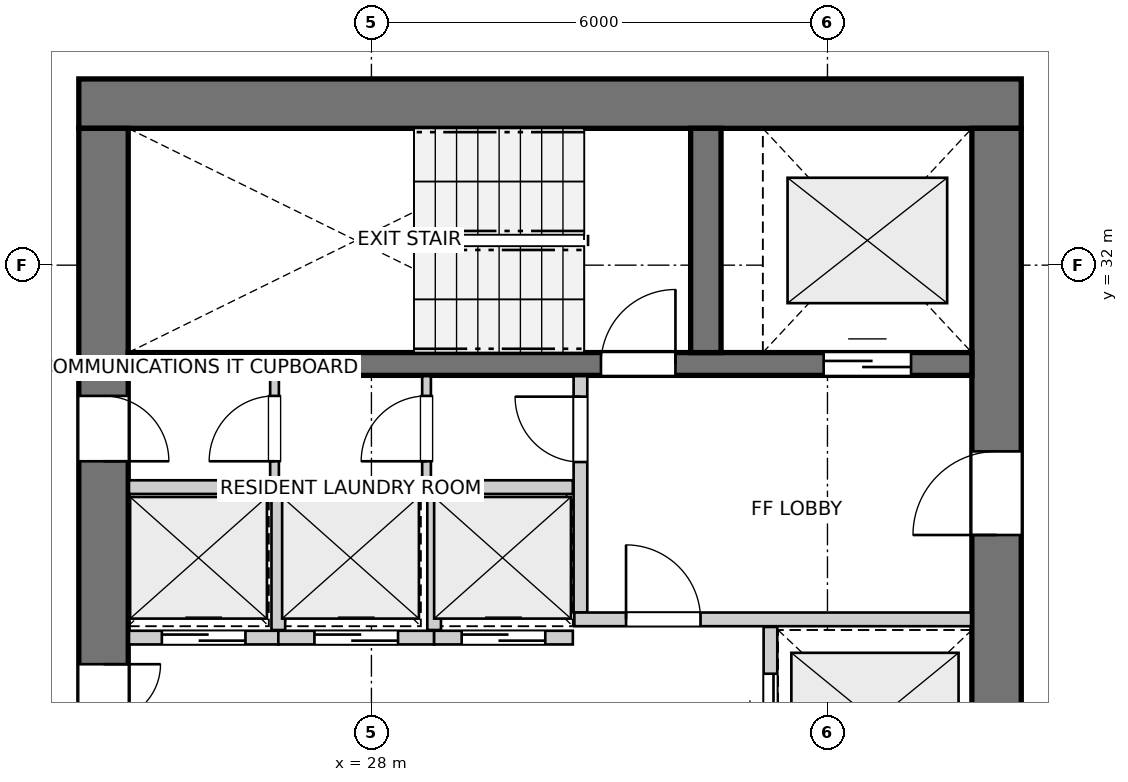
"""IFC4 building model, lengths in metres.
Left out: names, types, materials, properties, quantities, classifications, styles, units other than length and angle.
Written with IfcOpenShell. Run it as: python <this file> out.ifc"""

import sys

from ifc_helpers import new_model, si_unit, direction, frame, frame_2d, origin, place, context, subcontext, project, spatial, rectangle, extrude, source, transform, mapped, element, fill, save


model = new_model("IFC4")
c1 = context("Model", 3, precision=1e-05, world=origin(), true_north=direction((0.0, 1.0)))
c2 = subcontext(c1, "Body", "Model", "MODEL_VIEW")
j1 = project(units=[si_unit("LENGTHUNIT", "METRE"), si_unit("PLANEANGLEUNIT", "RADIAN")], contexts=[c1])
p1 = place(None, origin())
s1 = spatial("IfcSite", under=j1, at=p1, CompositionType="ELEMENT")
p2 = place(p1, origin())
s2 = spatial("IfcBuilding", under=s1, at=p2, CompositionType="ELEMENT")
p3 = place(p2, frame((0.0, 0.0, 187.4)))
s3 = spatial("IfcBuildingStorey", under=s2, at=p3, CompositionType="ELEMENT", Elevation=187.4)
p4 = place(p3, frame((36.55, 34.125, 0.0), z_axis=(0.0, 0.0, 1.0), x_axis=(-1.0, 0.0, 0.0)))
e1 = element("IfcWall", 1, at=p4, inside=s3, PredefinedType="SHEAR", context=c2, shape_type="SweptSolid", body=[
    extrude(rectangle(XDim=12.4, YDim=0.65, at=frame_2d((6.2, 0.0))), origin(), (0.0, 0.0, 1.0), 2.9),
])
p5 = place(p3, frame((24.475, 33.8, 0.0), z_axis=(0.0, 0.0, 1.0), x_axis=(0.0, -1.0, 0.0)))
e2 = element("IfcWall", 2, at=p5, inside=s3, PredefinedType="SHEAR", context=c2, shape_type="SweptSolid", body=[
    extrude(rectangle(XDim=15.6, YDim=0.65, at=frame_2d((7.8, 0.0))), origin(), (0.0, 0.0, 1.0), 2.9),
])
p6 = place(p5, frame((7.05, 0.0, 0.0)))
e3 = element("IfcOpeningElement", 3, at=p6, cuts=e2, PredefinedType="OPENING", context=c2, shape_type="SweptSolid", body=[
    extrude(rectangle(XDim=1.5, YDim=2.15, at=frame_2d((0.75, 1.075))), frame((0.0, 0.335, 0.0), z_axis=(0.0, -1.0, 0.0), x_axis=(1.0, 0.0, 0.0)), (0.0, 0.0, 1.0), 0.67),
])
p7 = place(p5, frame((3.52, 0.0, 0.0)))
e4 = element("IfcOpeningElement", 4, at=p7, cuts=e2, PredefinedType="OPENING", context=c2, shape_type="SweptSolid", body=[
    extrude(rectangle(XDim=0.86, YDim=2.05, at=frame_2d((0.43, 1.025))), frame((0.0, 0.335, 0.0), z_axis=(0.0, -1.0, 0.0), x_axis=(1.0, 0.0, 0.0)), (0.0, 0.0, 1.0), 0.67),
])
p8 = place(p5, frame((11.22, 0.0, 0.0)))
e5 = element("IfcOpeningElement", 5, at=p8, cuts=e2, PredefinedType="OPENING", context=c2, shape_type="SweptSolid", body=[
    extrude(rectangle(XDim=0.86, YDim=2.05, at=frame_2d((0.43, 1.025))), frame((0.0, 0.335, 0.0), z_axis=(0.0, -1.0, 0.0), x_axis=(1.0, 0.0, 0.0)), (0.0, 0.0, 1.0), 0.67),
])
p9 = place(p3, frame((36.225, 18.2, 0.0), z_axis=(0.0, 0.0, 1.0), x_axis=(0.0, 1.0, 0.0)))
e6 = element("IfcWall", 6, at=p9, inside=s3, PredefinedType="SHEAR", context=c2, shape_type="SweptSolid", body=[
    extrude(rectangle(XDim=15.6, YDim=0.65, at=frame_2d((7.8, 0.0))), origin(), (0.0, 0.0, 1.0), 2.9),
])
p10 = place(p9, frame((4.25, 0.0, 0.0)))
e7 = element("IfcOpeningElement", 7, at=p10, cuts=e6, PredefinedType="OPENING", context=c2, shape_type="SweptSolid", body=[
    extrude(rectangle(XDim=1.1, YDim=2.15, at=frame_2d((0.55, 1.075))), frame((0.0, 0.335, 0.0), z_axis=(0.0, -1.0, 0.0), x_axis=(1.0, 0.0, 0.0)), (0.0, 0.0, 1.0), 0.67),
])
p11 = place(p9, frame((10.25, 0.0, 0.0)))
e8 = element("IfcOpeningElement", 8, at=p11, cuts=e6, PredefinedType="OPENING", context=c2, shape_type="SweptSolid", body=[
    extrude(rectangle(XDim=1.1, YDim=2.15, at=frame_2d((0.55, 1.075))), frame((0.0, 0.335, 0.0), z_axis=(0.0, -1.0, 0.0), x_axis=(1.0, 0.0, 0.0)), (0.0, 0.0, 1.0), 0.67),
])
p12 = place(p3, frame((24.8, 30.7, 0.0), z_axis=(0.0, 0.0, 1.0), x_axis=(1.0, 0.0, 0.0)))
e9 = element("IfcWall", 9, at=p12, inside=s3, PredefinedType="SHEAR", context=c2, shape_type="SweptSolid", body=[
    extrude(rectangle(XDim=11.1, YDim=0.3, at=frame_2d((5.55, 0.0))), origin(), (0.0, 0.0, 1.0), 2.9),
])
p13 = place(p12, frame((6.22, 0.0, 0.0)))
e10 = element("IfcOpeningElement", 10, at=p13, cuts=e9, PredefinedType="OPENING", context=c2, shape_type="SweptSolid", body=[
    extrude(rectangle(XDim=0.98, YDim=2.15, at=frame_2d((0.49, 1.075))), frame((0.0, 0.16, 0.0), z_axis=(0.0, -1.0, 0.0), x_axis=(1.0, 0.0, 0.0)), (0.0, 0.0, 1.0), 0.32),
])
p14 = place(p12, frame((9.15, 0.0, 0.0)))
e11 = element("IfcOpeningElement", 11, at=p14, cuts=e9, PredefinedType="OPENING", context=c2, shape_type="SweptSolid", body=[
    extrude(rectangle(XDim=1.15, YDim=2.15, at=frame_2d((0.575, 1.075))), frame((0.0, 0.16, 0.0), z_axis=(0.0, -1.0, 0.0), x_axis=(1.0, 0.0, 0.0)), (0.0, 0.0, 1.0), 0.32),
])
p15 = place(p3, frame((32.4, 30.85, 0.0), z_axis=(0.0, 0.0, 1.0), x_axis=(0.0, 1.0, 0.0)))
e12 = element("IfcWall", 12, at=p15, inside=s3, PredefinedType="SHEAR", context=c2, shape_type="SweptSolid", body=[
    extrude(rectangle(XDim=2.95, YDim=0.4, at=frame_2d((1.475, 0.0))), origin(), (0.0, 0.0, 1.0), 2.9),
])
p16 = place(p3, frame((30.75, 27.43, 0.0), z_axis=(0.0, 0.0, 1.0), x_axis=(0.0, 1.0, 0.0)))
e13 = element("IfcWall", 13, at=p16, inside=s3, PredefinedType="PARTITIONING", context=c2, shape_type="SweptSolid", body=[
    extrude(rectangle(XDim=3.11, YDim=0.18, at=frame_2d((1.555, 0.0))), origin(), (0.0, 0.0, 1.0), 2.9),
])
p17 = place(p16, frame((1.98, 0.0, 0.0)))
e14 = element("IfcOpeningElement", 14, at=p17, cuts=e13, PredefinedType="OPENING", context=c2, shape_type="SweptSolid", body=[
    extrude(rectangle(XDim=0.86, YDim=2.05, at=frame_2d((0.43, 1.025))), frame((0.0, 0.1, 0.0), z_axis=(0.0, -1.0, 0.0), x_axis=(1.0, 0.0, 0.0)), (0.0, 0.0, 1.0), 0.2),
])
p18 = place(p3, frame((30.67, 27.34, 0.0), z_axis=(0.0, 0.0, 1.0), x_axis=(1.0, 0.0, 0.0)))
e15 = element("IfcWall", 15, at=p18, inside=s3, PredefinedType="PARTITIONING", context=c2, shape_type="SweptSolid", body=[
    extrude(rectangle(XDim=5.22, YDim=0.18, at=frame_2d((2.61, 0.0))), origin(), (0.0, 0.0, 1.0), 2.9),
])
p19 = place(p18, frame((0.68, 0.0, 0.0)))
e16 = element("IfcOpeningElement", 16, at=p19, cuts=e15, PredefinedType="OPENING", context=c2, shape_type="SweptSolid", body=[
    extrude(rectangle(XDim=0.98, YDim=2.15, at=frame_2d((0.49, 1.075))), frame((0.0, 0.1, 0.0), z_axis=(0.0, -1.0, 0.0), x_axis=(1.0, 0.0, 0.0)), (0.0, 0.0, 1.0), 0.2),
])
p20 = place(p3, frame((33.25, 24.76, 0.0), z_axis=(0.0, 0.0, 1.0), x_axis=(0.0, 1.0, 0.0)))
e17 = element("IfcWall", 17, at=p20, inside=s3, PredefinedType="PARTITIONING", context=c2, shape_type="SweptSolid", body=[
    extrude(rectangle(XDim=2.48, YDim=0.18, at=frame_2d((1.24, 0.0))), origin(), (0.0, 0.0, 1.0), 2.9),
])
p21 = place(p20, frame((0.615, 0.0, 0.0)))
e18 = element("IfcOpeningElement", 18, at=p21, cuts=e17, PredefinedType="OPENING", context=c2, shape_type="SweptSolid", body=[
    extrude(rectangle(XDim=1.25, YDim=2.15, at=frame_2d((0.625, 1.075))), frame((0.0, 0.1, 0.0), z_axis=(0.0, -1.0, 0.0), x_axis=(1.0, 0.0, 0.0)), (0.0, 0.0, 1.0), 0.2),
])
p22 = place(p3, frame((24.81, 29.08, 0.0), z_axis=(0.0, 0.0, 1.0), x_axis=(1.0, 0.0, 0.0)))
e19 = element("IfcWall", 19, at=p22, inside=s3, PredefinedType="PARTITIONING", context=c2, shape_type="SweptSolid", body=[
    extrude(rectangle(XDim=5.84, YDim=0.18, at=frame_2d((2.92, 0.0))), origin(), (0.0, 0.0, 1.0), 2.9),
])
p23 = place(p3, frame((24.81, 27.1, 0.0), z_axis=(0.0, 0.0, 1.0), x_axis=(1.0, 0.0, 0.0)))
e20 = element("IfcWall", 20, at=p23, inside=s3, PredefinedType="PARTITIONING", context=c2, shape_type="SweptSolid", body=[
    extrude(rectangle(XDim=1.965, YDim=0.18, at=frame_2d((0.982, 0.0))), origin(), (0.0, 0.0, 1.0), 2.9),
])
p24 = place(p23, frame((0.433, 0.0, 0.0)))
e21 = element("IfcOpeningElement", 21, at=p24, cuts=e20, PredefinedType="OPENING", context=c2, shape_type="SweptSolid", body=[
    extrude(rectangle(XDim=1.1, YDim=2.15, at=frame_2d((0.55, 1.075))), frame((0.0, 0.1, 0.0), z_axis=(0.0, -1.0, 0.0), x_axis=(1.0, 0.0, 0.0)), (0.0, 0.0, 1.0), 0.2),
])
p25 = place(p3, frame((26.775, 27.1, 0.0), z_axis=(0.0, 0.0, 1.0), x_axis=(1.0, 0.0, 0.0)))
e22 = element("IfcWall", 22, at=p25, inside=s3, PredefinedType="PARTITIONING", context=c2, shape_type="SweptSolid", body=[
    extrude(rectangle(XDim=2.05, YDim=0.18, at=frame_2d((1.025, 0.0))), origin(), (0.0, 0.0, 1.0), 2.9),
])
p26 = place(p25, frame((0.475, 0.0, 0.0)))
e23 = element("IfcOpeningElement", 23, at=p26, cuts=e22, PredefinedType="OPENING", context=c2, shape_type="SweptSolid", body=[
    extrude(rectangle(XDim=1.1, YDim=2.15, at=frame_2d((0.55, 1.075))), frame((0.0, 0.1, 0.0), z_axis=(0.0, -1.0, 0.0), x_axis=(1.0, 0.0, 0.0)), (0.0, 0.0, 1.0), 0.2),
])
p27 = place(p3, frame((26.775, 27.2, 0.0), z_axis=(0.0, 0.0, 1.0), x_axis=(0.0, 1.0, 0.0)))
e24 = element("IfcWall", 24, at=p27, inside=s3, PredefinedType="PARTITIONING", context=c2, shape_type="SweptSolid", body=[
    extrude(rectangle(XDim=1.78, YDim=0.18, at=frame_2d((0.89, 0.0))), origin(), (0.0, 0.0, 1.0), 2.9),
])
p28 = place(p3, frame((28.825, 27.1, 0.0), z_axis=(0.0, 0.0, 1.0), x_axis=(1.0, 0.0, 0.0)))
e25 = element("IfcWall", 25, at=p28, inside=s3, PredefinedType="PARTITIONING", context=c2, shape_type="SweptSolid", body=[
    extrude(rectangle(XDim=1.825, YDim=0.18, at=frame_2d((0.913, 0.0))), origin(), (0.0, 0.0, 1.0), 2.9),
])
p29 = place(p28, frame((0.363, 0.0, 0.0)))
e26 = element("IfcOpeningElement", 26, at=p29, cuts=e25, PredefinedType="OPENING", context=c2, shape_type="SweptSolid", body=[
    extrude(rectangle(XDim=1.1, YDim=2.15, at=frame_2d((0.55, 1.075))), frame((0.0, 0.1, 0.0), z_axis=(0.0, -1.0, 0.0), x_axis=(1.0, 0.0, 0.0)), (0.0, 0.0, 1.0), 0.2),
])
p30 = place(p3, frame((28.825, 27.2, 0.0), z_axis=(0.0, 0.0, 1.0), x_axis=(0.0, 1.0, 0.0)))
e27 = element("IfcWall", 27, at=p30, inside=s3, PredefinedType="PARTITIONING", context=c2, shape_type="SweptSolid", body=[
    extrude(rectangle(XDim=1.78, YDim=0.18, at=frame_2d((0.89, 0.0))), origin(), (0.0, 0.0, 1.0), 2.9),
])
p31 = place(p3, frame((26.725, 29.16, 0.0), z_axis=(0.0, 0.0, 1.0), x_axis=(0.0, 1.0, 0.0)))
e28 = element("IfcWall", 28, at=p31, inside=s3, PredefinedType="PARTITIONING", context=c2, shape_type="SweptSolid", body=[
    extrude(rectangle(XDim=1.38, YDim=0.115, at=frame_2d((0.69, 0.0))), origin(), (0.0, 0.0, 1.0), 2.9),
])
p32 = place(p31, frame((0.26, 0.0, 0.0)))
e29 = element("IfcOpeningElement", 29, at=p32, cuts=e28, PredefinedType="OPENING", context=c2, shape_type="SweptSolid", body=[
    extrude(rectangle(XDim=0.86, YDim=2.05, at=frame_2d((0.43, 1.025))), frame((0.0, 0.067, 0.0), z_axis=(0.0, -1.0, 0.0), x_axis=(1.0, 0.0, 0.0)), (0.0, 0.0, 1.0), 0.135),
])
p33 = place(p3, frame((28.725, 29.16, 0.0), z_axis=(0.0, 0.0, 1.0), x_axis=(0.0, 1.0, 0.0)))
e30 = element("IfcWall", 30, at=p33, inside=s3, PredefinedType="PARTITIONING", context=c2, shape_type="SweptSolid", body=[
    extrude(rectangle(XDim=1.38, YDim=0.115, at=frame_2d((0.69, 0.0))), origin(), (0.0, 0.0, 1.0), 2.9),
])
p34 = place(p33, frame((0.26, 0.0, 0.0)))
e31 = element("IfcOpeningElement", 31, at=p34, cuts=e30, PredefinedType="OPENING", context=c2, shape_type="SweptSolid", body=[
    extrude(rectangle(XDim=0.86, YDim=2.05, at=frame_2d((0.43, 1.025))), frame((0.0, 0.067, 0.0), z_axis=(0.0, -1.0, 0.0), x_axis=(1.0, 0.0, 0.0)), (0.0, 0.0, 1.0), 0.135),
])
m1 = source(origin(), c2, "Body", "SweptSolid", [
    extrude(rectangle(XDim=0.98, YDim=2.15, at=frame_2d((0.49, 1.075))), frame((0.0, 0.025, 0.0), z_axis=(0.0, -1.0, 0.0), x_axis=(1.0, 0.0, 0.0)), (0.0, 0.0, 1.0), 0.05),
])
p35 = place(p13, origin())
e32 = element("IfcDoor", 32, at=p35, inside=s3, OperationType="SINGLE_SWING_RIGHT", PredefinedType="DOOR", context=c2, shape_type="MappedRepresentation", body=[
    mapped(m1, transform((0.0, 0.0, 0.0), x_axis=(1.0, 0.0, 0.0), y_axis=(0.0, 1.0, 0.0), z_axis=(0.0, 0.0, 1.0), scale=1.0)),
])
fill(e10, e32)
m2 = source(origin(), c2, "Body", "SweptSolid", [
    extrude(rectangle(XDim=1.15, YDim=2.15, at=frame_2d((0.575, 1.075))), frame((0.0, 0.025, 0.0), z_axis=(0.0, -1.0, 0.0), x_axis=(1.0, 0.0, 0.0)), (0.0, 0.0, 1.0), 0.05),
])
p36 = place(p14, origin())
e33 = element("IfcDoor", 33, at=p36, inside=s3, OperationType="DOUBLE_DOOR_SLIDING", PredefinedType="DOOR", context=c2, shape_type="MappedRepresentation", body=[
    mapped(m2, transform((0.0, 0.0, 0.0), x_axis=(1.0, 0.0, 0.0), y_axis=(0.0, 1.0, 0.0), z_axis=(0.0, 0.0, 1.0), scale=1.0)),
])
fill(e11, e33)
m3 = source(origin(), c2, "Body", "SweptSolid", [
    extrude(rectangle(XDim=1.1, YDim=2.15, at=frame_2d((0.55, 1.075))), frame((0.0, 0.025, 0.0), z_axis=(0.0, -1.0, 0.0), x_axis=(1.0, 0.0, 0.0)), (0.0, 0.0, 1.0), 0.05),
])
p37 = place(p11, origin())
e34 = element("IfcDoor", 34, at=p37, inside=s3, OperationType="SINGLE_SWING_LEFT", PredefinedType="DOOR", context=c2, shape_type="MappedRepresentation", body=[
    mapped(m3, transform((0.0, 0.0, 0.0), x_axis=(1.0, 0.0, 0.0), y_axis=(0.0, 1.0, 0.0), z_axis=(0.0, 0.0, 1.0), scale=1.0)),
])
fill(e8, e34)
m4 = source(origin(), c2, "Body", "SweptSolid", [
    extrude(rectangle(XDim=1.5, YDim=2.15, at=frame_2d((0.75, 1.075))), frame((0.0, 0.025, 0.0), z_axis=(0.0, -1.0, 0.0), x_axis=(1.0, 0.0, 0.0)), (0.0, 0.0, 1.0), 0.05),
])
p38 = place(p6, origin())
e35 = element("IfcDoor", 35, at=p38, inside=s3, OperationType="DOUBLE_DOOR_SINGLE_SWING", PredefinedType="DOOR", context=c2, shape_type="MappedRepresentation", body=[
    mapped(m4, transform((0.0, 0.0, 0.0), x_axis=(1.0, 0.0, 0.0), y_axis=(0.0, 1.0, 0.0), z_axis=(0.0, 0.0, 1.0), scale=1.0)),
])
fill(e3, e35)
m5 = source(origin(), c2, "Body", "SweptSolid", [
    extrude(rectangle(XDim=0.86, YDim=2.05, at=frame_2d((0.43, 1.025))), frame((0.0, 0.025, 0.0), z_axis=(0.0, -1.0, 0.0), x_axis=(1.0, 0.0, 0.0)), (0.0, 0.0, 1.0), 0.05),
])
p39 = place(p7, origin())
e36 = element("IfcDoor", 36, at=p39, inside=s3, OperationType="SINGLE_SWING_RIGHT", PredefinedType="DOOR", context=c2, shape_type="MappedRepresentation", body=[
    mapped(m5, transform((0.0, 0.0, 0.0), x_axis=(1.0, 0.0, 0.0), y_axis=(0.0, 1.0, 0.0), z_axis=(0.0, 0.0, 1.0), scale=1.0)),
])
fill(e4, e36)
p40 = place(p17, origin())
e37 = element("IfcDoor", 37, at=p40, inside=s3, OperationType="SINGLE_SWING_RIGHT", PredefinedType="DOOR", context=c2, shape_type="MappedRepresentation", body=[
    mapped(m5, transform((0.0, 0.0, 0.0), x_axis=(1.0, 0.0, 0.0), y_axis=(0.0, 1.0, 0.0), z_axis=(0.0, 0.0, 1.0), scale=1.0)),
])
fill(e14, e37)
p41 = place(p19, origin())
e38 = element("IfcDoor", 38, at=p41, inside=s3, OperationType="SINGLE_SWING_LEFT", PredefinedType="DOOR", context=c2, shape_type="MappedRepresentation", body=[
    mapped(m1, transform((0.0, 0.0, 0.0), x_axis=(1.0, 0.0, 0.0), y_axis=(0.0, 1.0, 0.0), z_axis=(0.0, 0.0, 1.0), scale=1.0)),
])
fill(e16, e38)
m6 = source(origin(), c2, "Body", "SweptSolid", [
    extrude(rectangle(XDim=1.25, YDim=2.15, at=frame_2d((0.625, 1.075))), frame((0.0, 0.025, 0.0), z_axis=(0.0, -1.0, 0.0), x_axis=(1.0, 0.0, 0.0)), (0.0, 0.0, 1.0), 0.05),
])
p42 = place(p21, origin())
e39 = element("IfcDoor", 39, at=p42, inside=s3, OperationType="DOUBLE_DOOR_SLIDING", PredefinedType="DOOR", context=c2, shape_type="MappedRepresentation", body=[
    mapped(m6, transform((0.0, 0.0, 0.0), x_axis=(1.0, 0.0, 0.0), y_axis=(0.0, 1.0, 0.0), z_axis=(0.0, 0.0, 1.0), scale=1.0)),
])
fill(e18, e39)
p43 = place(p24, origin())
e40 = element("IfcDoor", 40, at=p43, inside=s3, OperationType="DOUBLE_DOOR_SLIDING", PredefinedType="DOOR", context=c2, shape_type="MappedRepresentation", body=[
    mapped(m3, transform((0.0, 0.0, 0.0), x_axis=(1.0, 0.0, 0.0), y_axis=(0.0, 1.0, 0.0), z_axis=(0.0, 0.0, 1.0), scale=1.0)),
])
fill(e21, e40)
p44 = place(p26, origin())
e41 = element("IfcDoor", 41, at=p44, inside=s3, OperationType="DOUBLE_DOOR_SLIDING", PredefinedType="DOOR", context=c2, shape_type="MappedRepresentation", body=[
    mapped(m3, transform((0.0, 0.0, 0.0), x_axis=(1.0, 0.0, 0.0), y_axis=(0.0, 1.0, 0.0), z_axis=(0.0, 0.0, 1.0), scale=1.0)),
])
fill(e23, e41)
p45 = place(p29, origin())
e42 = element("IfcDoor", 42, at=p45, inside=s3, OperationType="DOUBLE_DOOR_SLIDING", PredefinedType="DOOR", context=c2, shape_type="MappedRepresentation", body=[
    mapped(m3, transform((0.0, 0.0, 0.0), x_axis=(1.0, 0.0, 0.0), y_axis=(0.0, 1.0, 0.0), z_axis=(0.0, 0.0, 1.0), scale=1.0)),
])
fill(e26, e42)
p46 = place(p32, origin())
e43 = element("IfcDoor", 43, at=p46, inside=s3, OperationType="SINGLE_SWING_LEFT", PredefinedType="DOOR", context=c2, shape_type="MappedRepresentation", body=[
    mapped(m5, transform((0.0, 0.0, 0.0), x_axis=(1.0, 0.0, 0.0), y_axis=(0.0, 1.0, 0.0), z_axis=(0.0, 0.0, 1.0), scale=1.0)),
])
fill(e29, e43)
p47 = place(p34, origin())
e44 = element("IfcDoor", 44, at=p47, inside=s3, OperationType="SINGLE_SWING_LEFT", PredefinedType="DOOR", context=c2, shape_type="MappedRepresentation", body=[
    mapped(m5, transform((0.0, 0.0, 0.0), x_axis=(1.0, 0.0, 0.0), y_axis=(0.0, 1.0, 0.0), z_axis=(0.0, 0.0, 1.0), scale=1.0)),
])
fill(e31, e44)
save(model, sys.argv[1])
